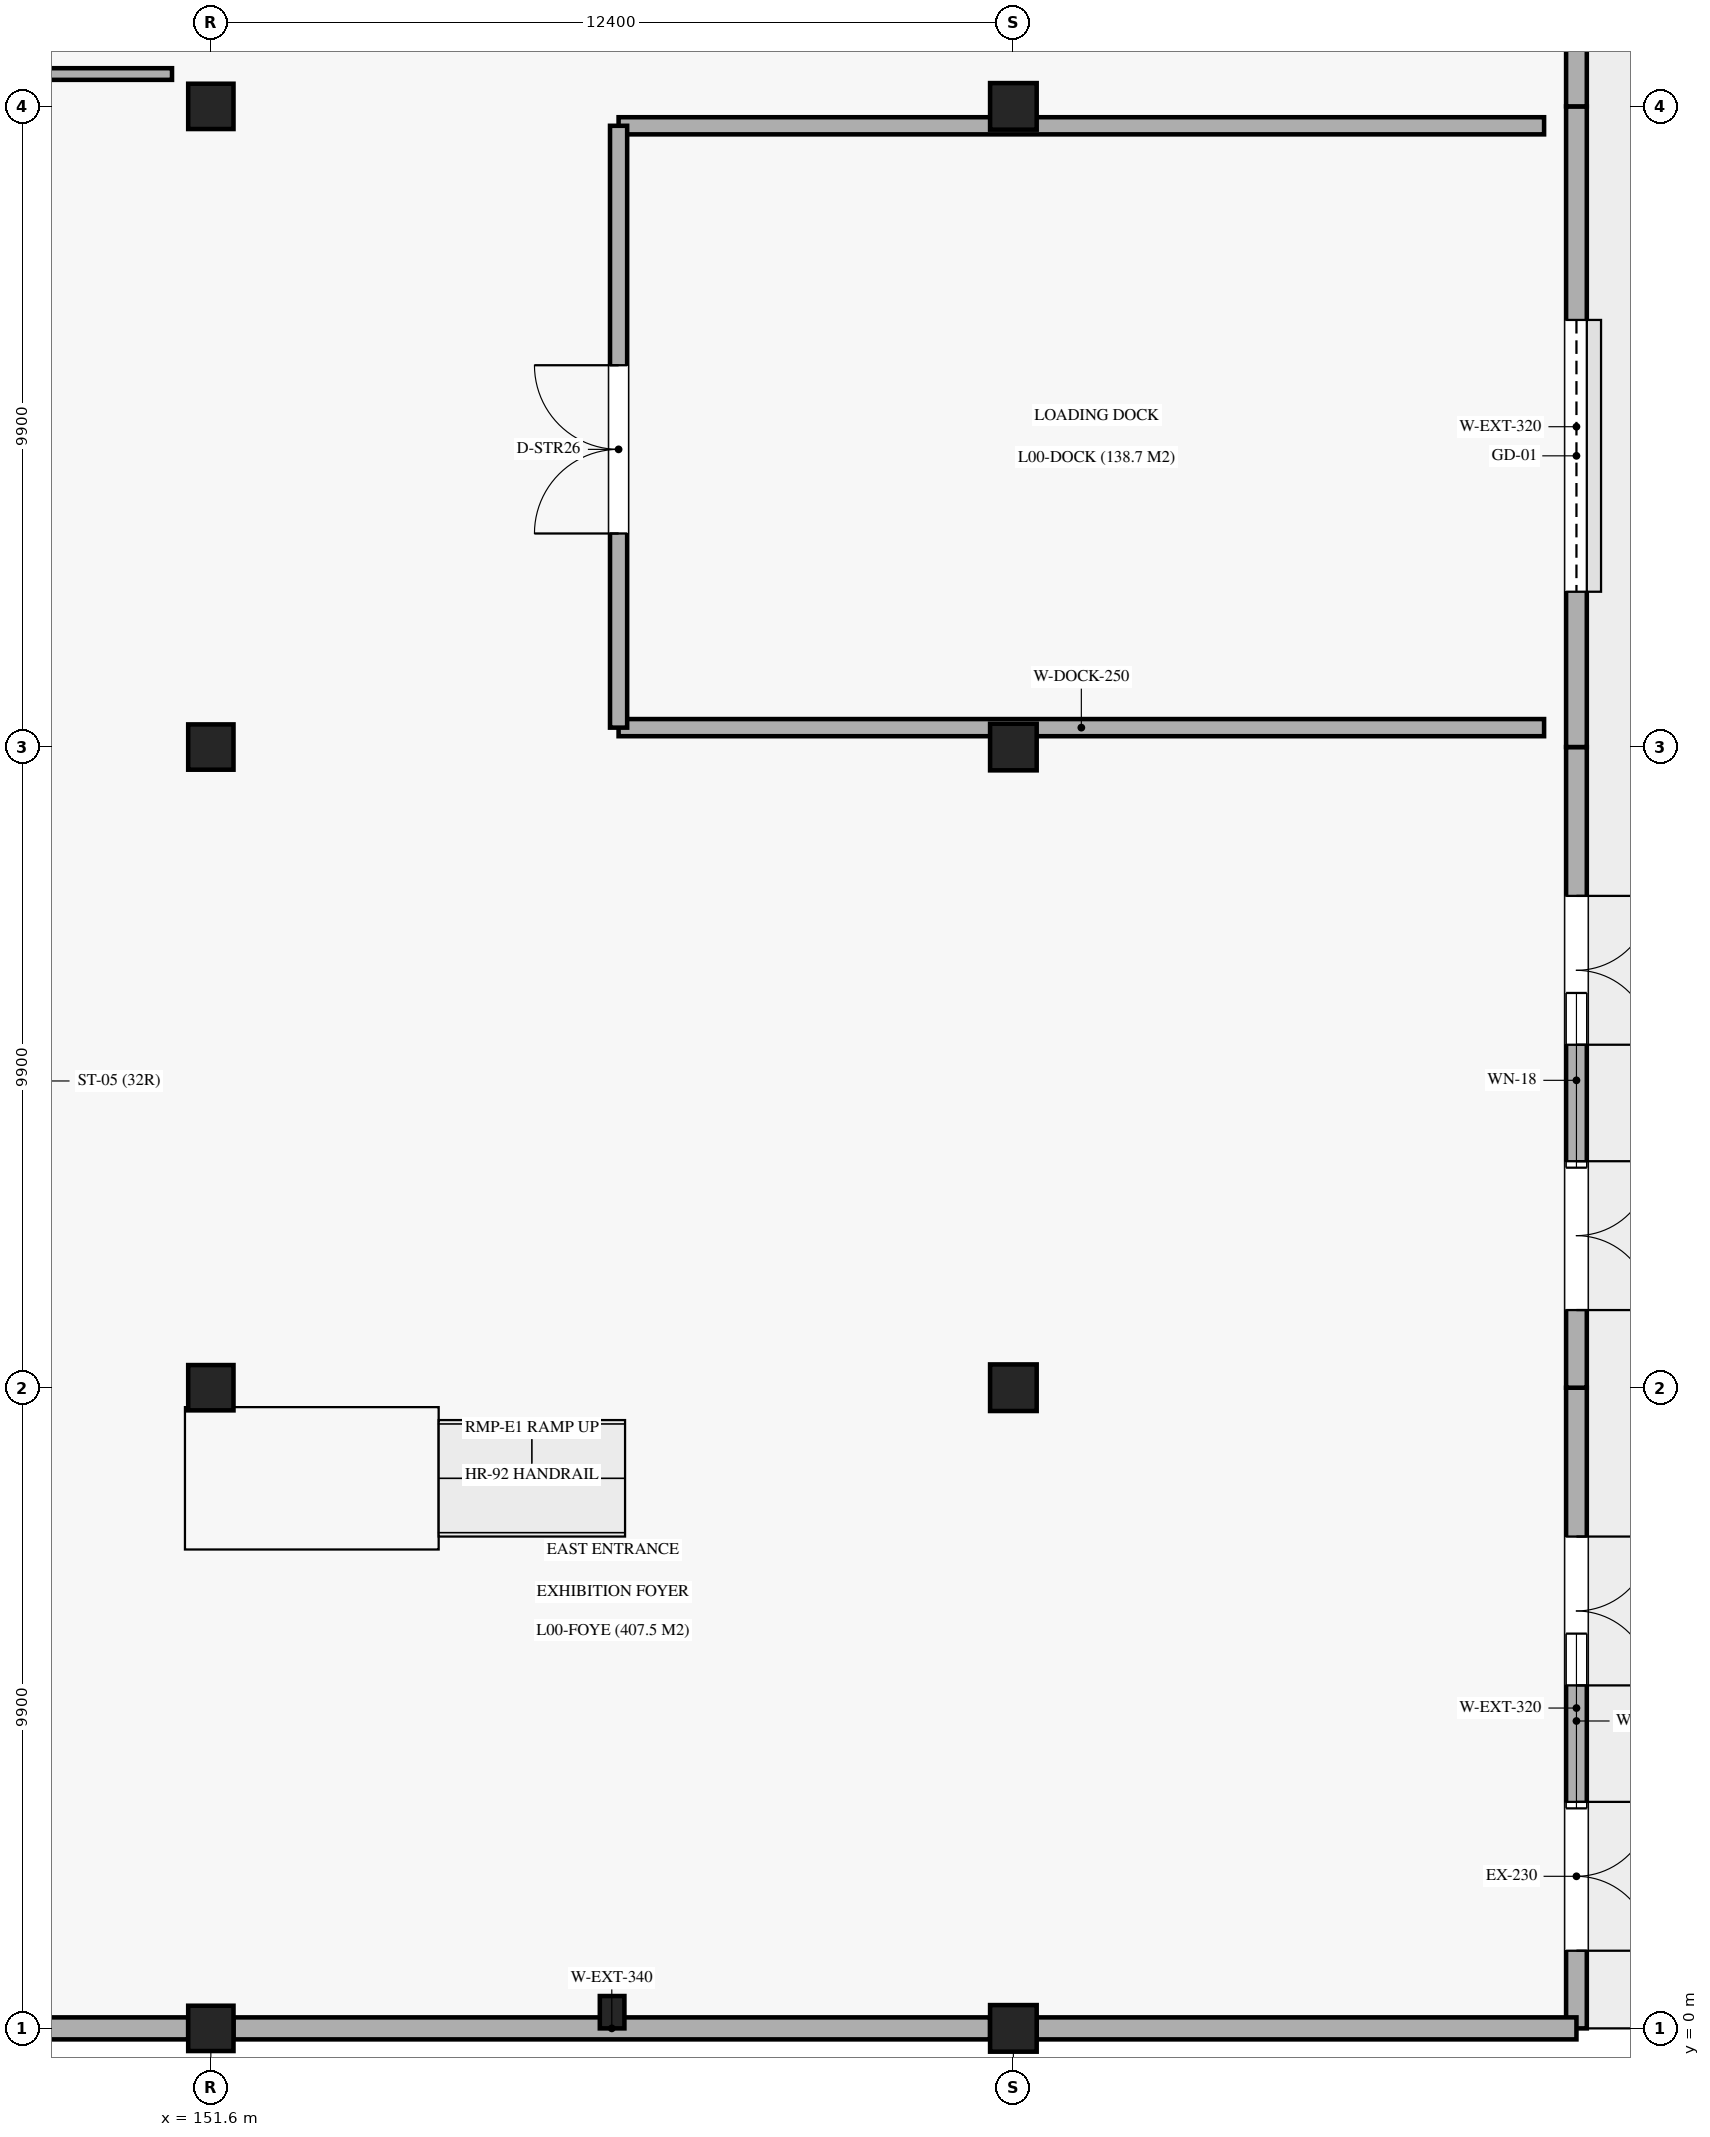
"""IFC4 building model, lengths in metres.
Left out: names, types, materials, properties, quantities, classifications, styles, units other than length and angle.
Written with IfcOpenShell. Run it as: python <this file> out.ifc"""

import sys

from ifc_helpers import new_model, si_unit, direction, frame, frame_2d, origin, origin_2d, place, context, subcontext, project, spatial, rectangle, circle, extrude, element, fill, save


model = new_model("IFC4")
c1 = context("Model", 3, precision=1e-05, world=origin(), true_north=direction((0.0, 1.0)))
c2 = subcontext(c1, "Body", "Model", "MODEL_VIEW")
j1 = project(units=[si_unit("LENGTHUNIT", "METRE"), si_unit("PLANEANGLEUNIT", "RADIAN")], contexts=[c1])
p1 = place(None, origin())
s1 = spatial("IfcSite", under=j1, at=p1, CompositionType="ELEMENT")
p2 = place(p1, origin())
s2 = spatial("IfcBuilding", under=s1, at=p2, CompositionType="ELEMENT")
p3 = place(p2, origin())
s3 = spatial("IfcBuildingStorey", under=s2, at=p3, CompositionType="ELEMENT", Elevation=0.0)
for number, where, z_axis, x_axis in (
    (1, (151.6, 0.0, 0.0), (0.0, 0.0, 1.0), (1.0, 0.0, 0.0)),
    (2, (151.6, 9.9, 0.0), (0.0, 0.0, 1.0), (1.0, 0.0, 0.0)),
    (3, (151.6, 19.8, 0.0), (0.0, 0.0, 1.0), (1.0, 0.0, 0.0)),
    (4, (151.6, 29.7, 0.0), (0.0, 0.0, 1.0), (1.0, 0.0, 0.0)),
):
    element("IfcColumn", number, at=place(p3, frame(where, z_axis=z_axis, x_axis=x_axis)), inside=s3, PredefinedType="COLUMN", context=c2, shape_type="SweptSolid", body=[
        extrude(rectangle(XDim=0.7, YDim=0.7, at=origin_2d()), origin(), (0.0, 0.0, 1.0), 5.44),
    ])
for number, where, z_axis, x_axis in (
    (5, (164.0, 0.0, 0.0), (0.0, 0.0, 1.0), (1.0, 0.0, 0.0)),
    (6, (164.0, 9.9, 0.0), (0.0, 0.0, 1.0), (1.0, 0.0, 0.0)),
    (7, (164.0, 19.8, 0.0), (0.0, 0.0, 1.0), (1.0, 0.0, 0.0)),
    (8, (164.0, 29.7, 0.0), (0.0, 0.0, 1.0), (1.0, 0.0, 0.0)),
):
    element("IfcColumn", number, at=place(p3, frame(where, z_axis=z_axis, x_axis=x_axis)), inside=s3, PredefinedType="COLUMN", context=c2, shape_type="SweptSolid", body=[
        extrude(circle(Radius=0.36, at=origin_2d()), origin(), (0.0, 0.0, 1.0), 5.44),
    ])
p4 = place(p3, frame((157.8, 0.25, 0.0), z_axis=(0.0, 0.0, 1.0), x_axis=(1.0, 0.0, 0.0)))
e9 = element("IfcColumn", 9, at=p4, inside=s3, PredefinedType="PILASTER", context=c2, shape_type="SweptSolid", body=[
    extrude(rectangle(XDim=0.38, YDim=0.5, at=origin_2d()), origin(), (0.0, 0.0, 1.0), 5.44),
])
p5 = place(p3, frame((172.7, 0.0, 0.0), z_axis=(0.0, 0.0, 1.0), x_axis=(0.0, 1.0, 0.0)))
e10 = element("IfcWall", 10, at=p5, inside=s3, PredefinedType="SOLIDWALL", context=c2, shape_type="SweptSolid", body=[
    extrude(rectangle(XDim=9.9, YDim=0.32, at=frame_2d((4.95, 0.0))), origin(), (0.0, 0.0, 1.0), 4.4),
])
p6 = place(p5, frame((3.4, 0.0, 2.65)))
e11 = element("IfcOpeningElement", 11, at=p6, cuts=e10, PredefinedType="OPENING", context=c2, shape_type="SweptSolid", body=[
    extrude(rectangle(XDim=2.7, YDim=1.5, at=frame_2d((1.35, 0.75))), frame((0.0, 0.17, 0.0), z_axis=(0.0, -1.0, 0.0), x_axis=(1.0, 0.0, 0.0)), (0.0, 0.0, 1.0), 0.34),
])
p7 = place(p5, frame((1.2, 0.0, 0.0)))
e12 = element("IfcOpeningElement", 12, at=p7, cuts=e10, PredefinedType="OPENING", context=c2, shape_type="SweptSolid", body=[
    extrude(rectangle(XDim=2.3, YDim=2.4, at=frame_2d((1.15, 1.2))), frame((0.0, 0.17, 0.0), z_axis=(0.0, -1.0, 0.0), x_axis=(1.0, 0.0, 0.0)), (0.0, 0.0, 1.0), 0.34),
])
p8 = place(p5, frame((5.3, 0.0, 0.0)))
e13 = element("IfcOpeningElement", 13, at=p8, cuts=e10, PredefinedType="OPENING", context=c2, shape_type="SweptSolid", body=[
    extrude(rectangle(XDim=2.3, YDim=2.4, at=frame_2d((1.15, 1.2))), frame((0.0, 0.17, 0.0), z_axis=(0.0, -1.0, 0.0), x_axis=(1.0, 0.0, 0.0)), (0.0, 0.0, 1.0), 0.34),
])
p9 = place(p3, frame((172.7, 9.9, 0.0), z_axis=(0.0, 0.0, 1.0), x_axis=(0.0, 1.0, 0.0)))
e14 = element("IfcWall", 14, at=p9, inside=s3, PredefinedType="SOLIDWALL", context=c2, shape_type="SweptSolid", body=[
    extrude(rectangle(XDim=9.9, YDim=0.32, at=frame_2d((4.95, 0.0))), origin(), (0.0, 0.0, 1.0), 4.4),
])
p10 = place(p9, frame((3.4, 0.0, 2.65)))
e15 = element("IfcOpeningElement", 15, at=p10, cuts=e14, PredefinedType="OPENING", context=c2, shape_type="SweptSolid", body=[
    extrude(rectangle(XDim=2.7, YDim=1.5, at=frame_2d((1.35, 0.75))), frame((0.0, 0.17, 0.0), z_axis=(0.0, -1.0, 0.0), x_axis=(1.0, 0.0, 0.0)), (0.0, 0.0, 1.0), 0.34),
])
p11 = place(p9, frame((1.2, 0.0, 0.0)))
e16 = element("IfcOpeningElement", 16, at=p11, cuts=e14, PredefinedType="OPENING", context=c2, shape_type="SweptSolid", body=[
    extrude(rectangle(XDim=2.3, YDim=2.4, at=frame_2d((1.15, 1.2))), frame((0.0, 0.17, 0.0), z_axis=(0.0, -1.0, 0.0), x_axis=(1.0, 0.0, 0.0)), (0.0, 0.0, 1.0), 0.34),
])
p12 = place(p9, frame((5.3, 0.0, 0.0)))
e17 = element("IfcOpeningElement", 17, at=p12, cuts=e14, PredefinedType="OPENING", context=c2, shape_type="SweptSolid", body=[
    extrude(rectangle(XDim=2.3, YDim=2.4, at=frame_2d((1.15, 1.2))), frame((0.0, 0.17, 0.0), z_axis=(0.0, -1.0, 0.0), x_axis=(1.0, 0.0, 0.0)), (0.0, 0.0, 1.0), 0.34),
])
p13 = place(p3, frame((172.7, 19.8, 0.0), z_axis=(0.0, 0.0, 1.0), x_axis=(0.0, 1.0, 0.0)))
e18 = element("IfcWall", 18, at=p13, inside=s3, PredefinedType="SOLIDWALL", context=c2, shape_type="SweptSolid", body=[
    extrude(rectangle(XDim=9.9, YDim=0.32, at=frame_2d((4.95, 0.0))), origin(), (0.0, 0.0, 1.0), 4.4),
])
p14 = place(p13, frame((2.4, 0.0, 0.0)))
e19 = element("IfcOpeningElement", 19, at=p14, cuts=e18, PredefinedType="OPENING", context=c2, shape_type="SweptSolid", body=[
    extrude(rectangle(XDim=4.2, YDim=4.1, at=frame_2d((2.1, 2.05))), frame((0.0, 0.17, 0.0), z_axis=(0.0, -1.0, 0.0), x_axis=(1.0, 0.0, 0.0)), (0.0, 0.0, 1.0), 0.34),
])
p15 = place(p3, frame((172.7, 29.7, 0.0), z_axis=(0.0, 0.0, 1.0), x_axis=(0.0, 1.0, 0.0)))
e20 = element("IfcWall", 20, at=p15, inside=s3, PredefinedType="SOLIDWALL", context=c2, shape_type="SweptSolid", body=[
    extrude(rectangle(XDim=9.9, YDim=0.32, at=frame_2d((4.95, 0.0))), origin(), (0.0, 0.0, 1.0), 4.4),
])
p16 = place(p15, frame((3.2, 0.0, 0.0)))
e21 = element("IfcOpeningElement", 21, at=p16, cuts=e20, PredefinedType="OPENING", context=c2, shape_type="SweptSolid", body=[
    extrude(rectangle(XDim=2.3, YDim=2.4, at=frame_2d((1.15, 1.2))), frame((0.0, 0.17, 0.0), z_axis=(0.0, -1.0, 0.0), x_axis=(1.0, 0.0, 0.0)), (0.0, 0.0, 1.0), 0.34),
])
p17 = place(p3, frame((139.55, 0.0, 0.0), z_axis=(0.0, 0.0, 1.0), x_axis=(1.0, 0.0, 0.0)))
e22 = element("IfcWall", 22, at=p17, inside=s3, PredefinedType="SOLIDWALL", context=c2, shape_type="SweptSolid", body=[
    extrude(rectangle(XDim=11.7, YDim=0.34, at=frame_2d((5.85, 0.0))), origin(), (0.0, 0.0, 1.0), 4.4),
])
p18 = place(p3, frame((151.95, 0.0, 0.0), z_axis=(0.0, 0.0, 1.0), x_axis=(1.0, 0.0, 0.0)))
e23 = element("IfcWall", 23, at=p18, inside=s3, PredefinedType="SOLIDWALL", context=c2, shape_type="SweptSolid", body=[
    extrude(rectangle(XDim=11.69, YDim=0.34, at=frame_2d((5.845, 0.0))), origin(), (0.0, 0.0, 1.0), 4.4),
])
p19 = place(p3, frame((164.36, 0.0, 0.0), z_axis=(0.0, 0.0, 1.0), x_axis=(1.0, 0.0, 0.0)))
e24 = element("IfcWall", 24, at=p19, inside=s3, PredefinedType="SOLIDWALL", context=c2, shape_type="SweptSolid", body=[
    extrude(rectangle(XDim=8.34, YDim=0.34, at=frame_2d((4.17, 0.0))), origin(), (0.0, 0.0, 1.0), 4.4),
])
for number, where, z_axis, x_axis in (
    (25, (157.9, 20.1, 0.0), (0.0, 0.0, 1.0), (1.0, 0.0, 0.0)),
    (26, (157.9, 29.4, 0.0), (0.0, 0.0, 1.0), (1.0, 0.0, 0.0)),
):
    element("IfcWall", number, at=place(p3, frame(where, z_axis=z_axis, x_axis=x_axis)), inside=s3, PredefinedType="SOLIDWALL", context=c2, shape_type="SweptSolid", body=[
        extrude(rectangle(XDim=14.3, YDim=0.265, at=frame_2d((7.15, 0.0))), origin(), (0.0, 0.0, 1.0), 4.3),
    ])
p20 = place(p3, frame((157.9, 20.1, 0.0), z_axis=(0.0, 0.0, 1.0), x_axis=(0.0, 1.0, 0.0)))
e27 = element("IfcWall", 27, at=p20, inside=s3, PredefinedType="SOLIDWALL", context=c2, shape_type="SweptSolid", body=[
    extrude(rectangle(XDim=9.3, YDim=0.265, at=frame_2d((4.65, 0.0))), origin(), (0.0, 0.0, 1.0), 4.3),
])
p21 = place(p20, frame((3.0, 0.0, 0.0)))
e28 = element("IfcOpeningElement", 28, at=p21, cuts=e27, PredefinedType="OPENING", context=c2, shape_type="SweptSolid", body=[
    extrude(rectangle(XDim=2.6, YDim=2.6, at=frame_2d((1.3, 1.3))), frame((0.0, 0.142, 0.0), z_axis=(0.0, -1.0, 0.0), x_axis=(1.0, 0.0, 0.0)), (0.0, 0.0, 1.0), 0.285),
])
p22 = place(p3, frame((115.0, 30.2, 0.0), z_axis=(0.0, 0.0, 1.0), x_axis=(1.0, 0.0, 0.0)))
e29 = element("IfcWall", 29, at=p22, inside=s3, PredefinedType="PARTITIONING", context=c2, shape_type="SweptSolid", body=[
    extrude(rectangle(XDim=36.0, YDim=0.18, at=frame_2d((18.0, 0.0))), origin(), (0.0, 0.0, 1.0), 4.3),
])
p23 = place(p22, frame((20.0, 0.0, 0.0)))
e30 = element("IfcOpeningElement", 30, at=p23, cuts=e29, PredefinedType="OPENING", context=c2, shape_type="SweptSolid", body=[
    extrude(rectangle(XDim=1.5, YDim=2.2, at=frame_2d((0.75, 1.1))), frame((0.0, 0.1, 0.0), z_axis=(0.0, -1.0, 0.0), x_axis=(1.0, 0.0, 0.0)), (0.0, 0.0, 1.0), 0.2),
])
p24 = place(p6, origin())
e31 = element("IfcWindow", 31, at=p24, inside=s3, PartitioningType="SINGLE_PANEL", PredefinedType="WINDOW", context=c2, shape_type="SweptSolid", body=[
    extrude(rectangle(XDim=2.7, YDim=1.5, at=frame_2d((1.35, 0.75))), frame((0.0, 0.03, 0.0), z_axis=(0.0, -1.0, 0.0), x_axis=(1.0, 0.0, 0.0)), (0.0, 0.0, 1.0), 0.06),
])
fill(e11, e31)
p25 = place(p7, frame((2.3, 0.0, 0.0), z_axis=(0.0, 0.0, 1.0), x_axis=(-1.0, 0.0, 0.0)))
e32 = element("IfcDoor", 32, at=p25, inside=s3, OperationType="DOUBLE_DOOR_SINGLE_SWING", PredefinedType="DOOR", context=c2, shape_type="SweptSolid", body=[
    extrude(rectangle(XDim=2.3, YDim=2.4, at=frame_2d((1.15, 1.2))), frame((0.0, 0.025, 0.0), z_axis=(0.0, -1.0, 0.0), x_axis=(1.0, 0.0, 0.0)), (0.0, 0.0, 1.0), 0.05),
])
fill(e12, e32)
p26 = place(p8, frame((2.3, 0.0, 0.0), z_axis=(0.0, 0.0, 1.0), x_axis=(-1.0, 0.0, 0.0)))
e33 = element("IfcDoor", 33, at=p26, inside=s3, OperationType="DOUBLE_DOOR_SINGLE_SWING", PredefinedType="DOOR", context=c2, shape_type="SweptSolid", body=[
    extrude(rectangle(XDim=2.3, YDim=2.4, at=frame_2d((1.15, 1.2))), frame((0.0, 0.025, 0.0), z_axis=(0.0, -1.0, 0.0), x_axis=(1.0, 0.0, 0.0)), (0.0, 0.0, 1.0), 0.05),
])
fill(e13, e33)
p27 = place(p10, origin())
e34 = element("IfcWindow", 34, at=p27, inside=s3, PartitioningType="SINGLE_PANEL", PredefinedType="WINDOW", context=c2, shape_type="SweptSolid", body=[
    extrude(rectangle(XDim=2.7, YDim=1.5, at=frame_2d((1.35, 0.75))), frame((0.0, 0.03, 0.0), z_axis=(0.0, -1.0, 0.0), x_axis=(1.0, 0.0, 0.0)), (0.0, 0.0, 1.0), 0.06),
])
fill(e15, e34)
p28 = place(p11, frame((2.3, 0.0, 0.0), z_axis=(0.0, 0.0, 1.0), x_axis=(-1.0, 0.0, 0.0)))
e35 = element("IfcDoor", 35, at=p28, inside=s3, OperationType="DOUBLE_DOOR_SINGLE_SWING", PredefinedType="DOOR", context=c2, shape_type="SweptSolid", body=[
    extrude(rectangle(XDim=2.3, YDim=2.4, at=frame_2d((1.15, 1.2))), frame((0.0, 0.025, 0.0), z_axis=(0.0, -1.0, 0.0), x_axis=(1.0, 0.0, 0.0)), (0.0, 0.0, 1.0), 0.05),
])
fill(e16, e35)
p29 = place(p12, frame((2.3, 0.0, 0.0), z_axis=(0.0, 0.0, 1.0), x_axis=(-1.0, 0.0, 0.0)))
e36 = element("IfcDoor", 36, at=p29, inside=s3, OperationType="DOUBLE_DOOR_SINGLE_SWING", PredefinedType="DOOR", context=c2, shape_type="SweptSolid", body=[
    extrude(rectangle(XDim=2.3, YDim=2.4, at=frame_2d((1.15, 1.2))), frame((0.0, 0.025, 0.0), z_axis=(0.0, -1.0, 0.0), x_axis=(1.0, 0.0, 0.0)), (0.0, 0.0, 1.0), 0.05),
])
fill(e17, e36)
p30 = place(p14, frame((4.2, 0.0, 0.0), z_axis=(0.0, 0.0, 1.0), x_axis=(-1.0, 0.0, 0.0)))
e37 = element("IfcDoor", 37, at=p30, inside=s3, OperationType="ROLLINGUP", PredefinedType="GATE", context=c2, shape_type="SweptSolid", body=[
    extrude(rectangle(XDim=4.2, YDim=4.1, at=frame_2d((2.1, 2.05))), frame((0.0, 0.025, 0.0), z_axis=(0.0, -1.0, 0.0), x_axis=(1.0, 0.0, 0.0)), (0.0, 0.0, 1.0), 0.05),
])
fill(e19, e37)
p31 = place(p21, origin())
e38 = element("IfcDoor", 38, at=p31, inside=s3, OperationType="DOUBLE_DOOR_SINGLE_SWING", PredefinedType="DOOR", context=c2, shape_type="SweptSolid", body=[
    extrude(rectangle(XDim=2.6, YDim=2.6, at=frame_2d((1.3, 1.3))), frame((0.0, 0.025, 0.0), z_axis=(0.0, -1.0, 0.0), x_axis=(1.0, 0.0, 0.0)), (0.0, 0.0, 1.0), 0.05),
])
fill(e28, e38)
save(model, sys.argv[1])
